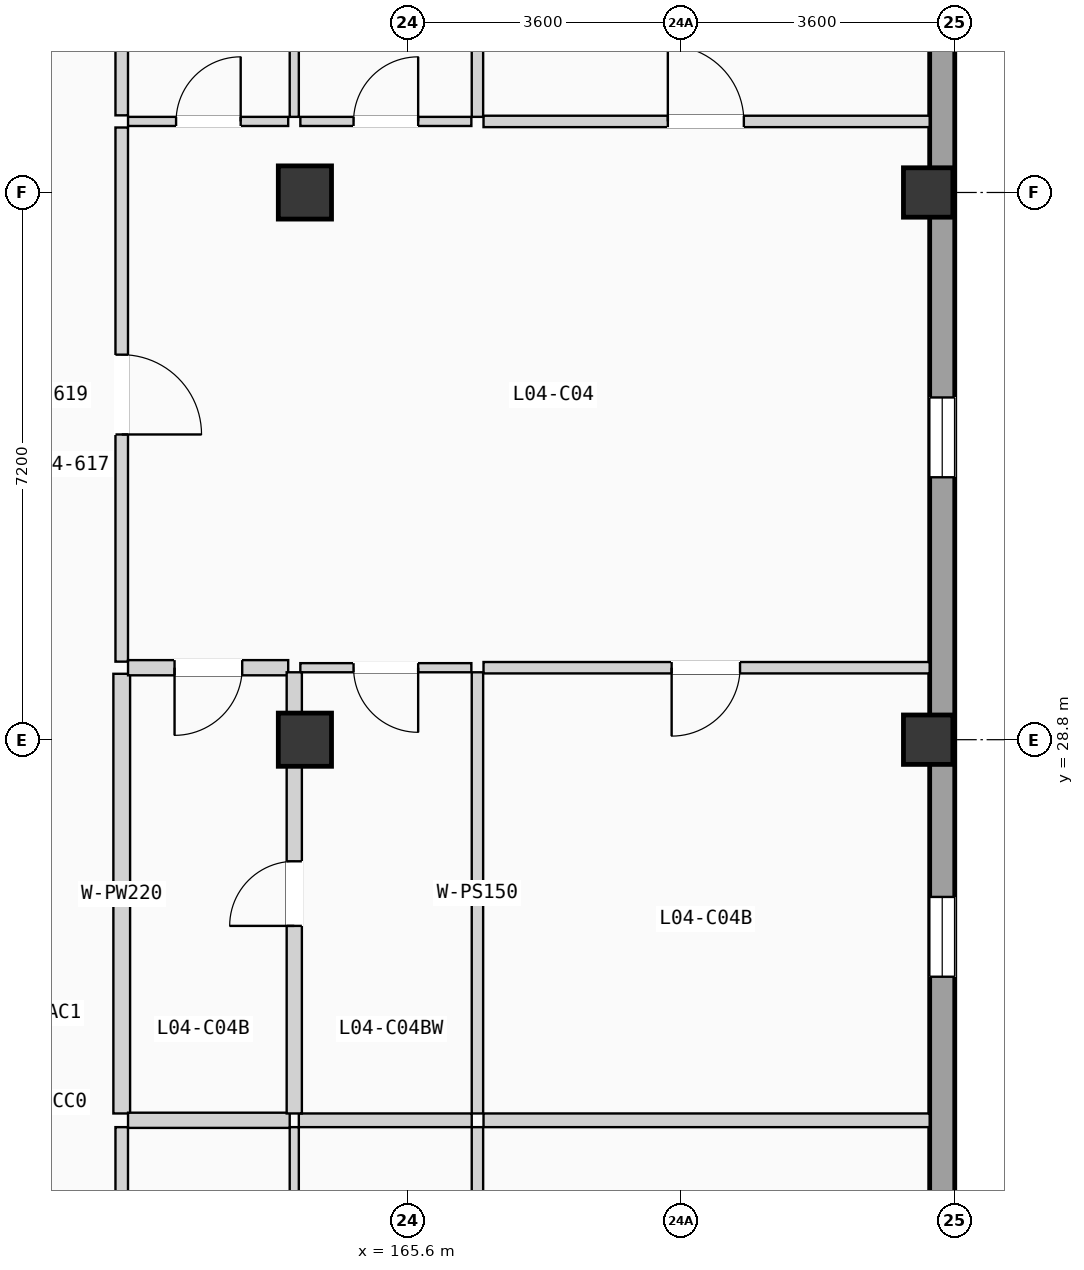
"""IFC4 building model, lengths in metres.
Left out: names, types, materials, properties, quantities, classifications, styles, units other than length and angle.
Written with IfcOpenShell. Run it as: python <this file> out.ifc"""

import sys

from ifc_helpers import new_model, si_unit, direction, frame, frame_2d, origin, origin_2d, place, context, subcontext, project, spatial, rectangle, extrude, element, fill, save


model = new_model("IFC4")
c1 = context("Model", 3, precision=1e-05, world=origin(), true_north=direction((0.0, 1.0)))
c2 = subcontext(c1, "Body", "Model", "MODEL_VIEW")
j1 = project(units=[si_unit("LENGTHUNIT", "METRE"), si_unit("PLANEANGLEUNIT", "RADIAN")], contexts=[c1])
p1 = place(None, origin())
s1 = spatial("IfcSite", under=j1, at=p1, CompositionType="ELEMENT")
p2 = place(p1, origin())
s2 = spatial("IfcBuilding", under=s1, at=p2, CompositionType="ELEMENT")
p3 = place(p2, frame((0.0, 0.0, 15.225)))
s3 = spatial("IfcBuildingStorey", under=s2, at=p3, CompositionType="ELEMENT", Elevation=15.225)
for number, where, z_axis, x_axis in (
    (1, (164.25, 28.8, 0.0), (0.0, 0.0, 1.0), (1.0, 0.0, 0.0)),
    (2, (164.25, 36.0, 0.0), (0.0, 0.0, 1.0), (1.0, 0.0, 0.0)),
):
    element("IfcColumn", number, at=place(p3, frame(where, z_axis=z_axis, x_axis=x_axis)), inside=s3, PredefinedType="COLUMN", context=c2, shape_type="SweptSolid", body=[
        extrude(rectangle(XDim=0.7, YDim=0.7, at=origin_2d()), origin(), (0.0, 0.0, 1.0), 3.15),
    ])
for number, where, z_axis, x_axis in (
    (3, (172.45, 28.8, 0.0), (0.0, 0.0, 1.0), (1.0, 0.0, 0.0)),
    (4, (172.45, 36.0, 0.0), (0.0, 0.0, 1.0), (1.0, 0.0, 0.0)),
):
    element("IfcColumn", number, at=place(p3, frame(where, z_axis=z_axis, x_axis=x_axis)), inside=s3, PredefinedType="COLUMN", context=c2, shape_type="SweptSolid", body=[
        extrude(rectangle(XDim=0.65, YDim=0.65, at=origin_2d()), origin(), (0.0, 0.0, 1.0), 3.15),
    ])
p4 = place(p3, frame((172.635, 0.33, 0.0), z_axis=(0.0, 0.0, 1.0), x_axis=(0.0, 1.0, 0.0)))
e5 = element("IfcWall", 5, at=p4, inside=s3, PredefinedType="SOLIDWALL", context=c2, shape_type="SweptSolid", body=[
    extrude(rectangle(XDim=49.74, YDim=0.33, at=frame_2d((24.87, 0.0))), origin(), (0.0, 0.0, 1.0), 2.89),
])
p5 = place(p4, frame((15.845, 0.0, 0.85)))
e6 = element("IfcOpeningElement", 6, at=p5, cuts=e5, PredefinedType="OPENING", context=c2, shape_type="SweptSolid", body=[
    extrude(rectangle(XDim=0.95, YDim=1.2, at=frame_2d((0.475, 0.6))), frame((0.0, 0.175, 0.0), z_axis=(0.0, -1.0, 0.0), x_axis=(1.0, 0.0, 0.0)), (0.0, 0.0, 1.0), 0.35),
])
p6 = place(p4, frame((9.201, 0.0, 0.9)))
e7 = element("IfcOpeningElement", 7, at=p6, cuts=e5, PredefinedType="OPENING", context=c2, shape_type="SweptSolid", body=[
    extrude(rectangle(XDim=1.05, YDim=1.2, at=frame_2d((0.525, 0.6))), frame((0.0, 0.175, 0.0), z_axis=(0.0, -1.0, 0.0), x_axis=(1.0, 0.0, 0.0)), (0.0, 0.0, 1.0), 0.35),
])
p7 = place(p4, frame((19.205, 0.0, 0.855)))
e8 = element("IfcOpeningElement", 8, at=p7, cuts=e5, PredefinedType="OPENING", context=c2, shape_type="SweptSolid", body=[
    extrude(rectangle(XDim=1.05, YDim=1.35, at=frame_2d((0.525, 0.675))), frame((0.0, 0.175, 0.0), z_axis=(0.0, -1.0, 0.0), x_axis=(1.0, 0.0, 0.0)), (0.0, 0.0, 1.0), 0.35),
])
p8 = place(p4, frame((31.923, 0.0, 0.705)))
e9 = element("IfcOpeningElement", 9, at=p8, cuts=e5, PredefinedType="OPENING", context=c2, shape_type="SweptSolid", body=[
    extrude(rectangle(XDim=1.05, YDim=1.5, at=frame_2d((0.525, 0.75))), frame((0.0, 0.175, 0.0), z_axis=(0.0, -1.0, 0.0), x_axis=(1.0, 0.0, 0.0)), (0.0, 0.0, 1.0), 0.35),
])
p9 = place(p4, frame((25.351, 0.0, 0.555)))
e10 = element("IfcOpeningElement", 10, at=p9, cuts=e5, PredefinedType="OPENING", context=c2, shape_type="SweptSolid", body=[
    extrude(rectangle(XDim=1.05, YDim=1.65, at=frame_2d((0.525, 0.825))), frame((0.0, 0.175, 0.0), z_axis=(0.0, -1.0, 0.0), x_axis=(1.0, 0.0, 0.0)), (0.0, 0.0, 1.0), 0.35),
])
p10 = place(p4, frame((39.102, 0.0, 0.85)))
e11 = element("IfcOpeningElement", 11, at=p10, cuts=e5, PredefinedType="OPENING", context=c2, shape_type="SweptSolid", body=[
    extrude(rectangle(XDim=0.95, YDim=1.2, at=frame_2d((0.475, 0.6))), frame((0.0, 0.175, 0.0), z_axis=(0.0, -1.0, 0.0), x_axis=(1.0, 0.0, 0.0)), (0.0, 0.0, 1.0), 0.35),
])
p11 = place(p3, frame((161.84, 18.79, 0.0), z_axis=(0.0, 0.0, 1.0), x_axis=(0.0, 1.0, 0.0)))
e12 = element("IfcWall", 12, at=p11, inside=s3, PredefinedType="PARTITIONING", context=c2, shape_type="SweptSolid", body=[
    extrude(rectangle(XDim=4.912, YDim=0.165, at=frame_2d((2.456, 0.0))), origin(), (0.0, 0.0, 1.0), 2.87),
])
p12 = place(p3, frame((161.84, 29.827, 0.0), z_axis=(0.0, 0.0, 1.0), x_axis=(0.0, 1.0, 0.0)))
e13 = element("IfcWall", 13, at=p12, inside=s3, PredefinedType="PARTITIONING", context=c2, shape_type="SweptSolid", body=[
    extrude(rectangle(XDim=7.028, YDim=0.165, at=frame_2d((3.514, 0.0))), origin(), (0.0, 0.0, 1.0), 2.87),
])
p13 = place(p12, frame((2.989, 0.0, 0.0)))
e14 = element("IfcOpeningElement", 14, at=p13, cuts=e13, PredefinedType="OPENING", context=c2, shape_type="SweptSolid", body=[
    extrude(rectangle(XDim=1.05, YDim=2.13, at=frame_2d((0.525, 1.065))), frame((0.0, 0.093, 0.0), z_axis=(0.0, -1.0, 0.0), x_axis=(1.0, 0.0, 0.0)), (0.0, 0.0, 1.0), 0.185),
])
p14 = place(p3, frame((161.84, 23.882, 0.0), z_axis=(0.0, 0.0, 1.0), x_axis=(0.0, 1.0, 0.0)))
e15 = element("IfcWall", 15, at=p14, inside=s3, PredefinedType="PLUMBINGWALL", context=c2, shape_type="SweptSolid", body=[
    extrude(rectangle(XDim=5.785, YDim=0.22, at=frame_2d((2.893, 0.0))), origin(), (0.0, 0.0, 1.0), 2.87),
])
p15 = place(p3, frame((161.84, 37.015, 0.0), z_axis=(0.0, 0.0, 1.0), x_axis=(0.0, 1.0, 0.0)))
e16 = element("IfcWall", 16, at=p15, inside=s3, PredefinedType="PARTITIONING", context=c2, shape_type="SweptSolid", body=[
    extrude(rectangle(XDim=5.785, YDim=0.165, at=frame_2d((2.893, 0.0))), origin(), (0.0, 0.0, 1.0), 2.87),
])
p16 = place(p3, frame((164.11, 18.77, 0.0), z_axis=(0.0, 0.0, 1.0), x_axis=(0.0, 1.0, 0.0)))
e17 = element("IfcWall", 17, at=p16, inside=s3, PredefinedType="PARTITIONING", context=c2, shape_type="SweptSolid", body=[
    extrude(rectangle(XDim=4.932, YDim=0.12, at=frame_2d((2.466, 0.0))), origin(), (0.0, 0.0, 1.0), 2.87),
])
p17 = place(p3, frame((161.923, 23.792, 0.0), z_axis=(0.0, 0.0, 1.0), x_axis=(1.0, 0.0, 0.0)))
e18 = element("IfcWall", 18, at=p17, inside=s3, PredefinedType="PLUMBINGWALL", context=c2, shape_type="SweptSolid", body=[
    extrude(rectangle(XDim=2.127, YDim=0.2, at=frame_2d((1.063, 0.0))), origin(), (0.0, 0.0, 1.0), 2.87),
])
p18 = place(p3, frame((166.52, 18.77, 0.0), z_axis=(0.0, 0.0, 1.0), x_axis=(0.0, 1.0, 0.0)))
e19 = element("IfcWall", 19, at=p18, inside=s3, PredefinedType="PARTITIONING", context=c2, shape_type="SweptSolid", body=[
    extrude(rectangle(XDim=4.932, YDim=0.15, at=frame_2d((2.466, 0.0))), origin(), (0.0, 0.0, 1.0), 2.87),
])
p19 = place(p3, frame((166.6, 23.792, 0.0), z_axis=(0.0, 0.0, 1.0), x_axis=(1.0, 0.0, 0.0)))
e20 = element("IfcWall", 20, at=p19, inside=s3, PredefinedType="PARTITIONING", context=c2, shape_type="SweptSolid", body=[
    extrude(rectangle(XDim=5.87, YDim=0.18, at=frame_2d((2.935, 0.0))), origin(), (0.0, 0.0, 1.0), 2.87),
])
p20 = place(p3, frame((164.17, 23.792, 0.0), z_axis=(0.0, 0.0, 1.0), x_axis=(1.0, 0.0, 0.0)))
e21 = element("IfcWall", 21, at=p20, inside=s3, PredefinedType="PARTITIONING", context=c2, shape_type="SweptSolid", body=[
    extrude(rectangle(XDim=2.275, YDim=0.18, at=frame_2d((1.138, 0.0))), origin(), (0.0, 0.0, 1.0), 2.87),
])
p21 = place(p3, frame((161.923, 29.747, 0.0), z_axis=(0.0, 0.0, 1.0), x_axis=(1.0, 0.0, 0.0)))
e22 = element("IfcWall", 22, at=p21, inside=s3, PredefinedType="PLUMBINGWALL", context=c2, shape_type="SweptSolid", body=[
    extrude(rectangle(XDim=2.107, YDim=0.2, at=frame_2d((1.053, 0.0))), origin(), (0.0, 0.0, 1.0), 2.87),
])
p22 = place(p21, frame((0.612, 0.0, 0.0)))
e23 = element("IfcOpeningElement", 23, at=p22, cuts=e22, PredefinedType="OPENING", context=c2, shape_type="SweptSolid", body=[
    extrude(rectangle(XDim=0.89, YDim=2.03, at=frame_2d((0.445, 1.015))), frame((0.0, 0.11, 0.0), z_axis=(0.0, -1.0, 0.0), x_axis=(1.0, 0.0, 0.0)), (0.0, 0.0, 1.0), 0.22),
])
p23 = place(p3, frame((161.923, 36.935, 0.0), z_axis=(0.0, 0.0, 1.0), x_axis=(1.0, 0.0, 0.0)))
e24 = element("IfcWall", 24, at=p23, inside=s3, PredefinedType="PARTITIONING", context=c2, shape_type="SweptSolid", body=[
    extrude(rectangle(XDim=2.107, YDim=0.12, at=frame_2d((1.053, 0.0))), origin(), (0.0, 0.0, 1.0), 2.87),
])
p24 = place(p23, frame((0.632, 0.0, 0.0)))
e25 = element("IfcOpeningElement", 25, at=p24, cuts=e24, PredefinedType="OPENING", context=c2, shape_type="SweptSolid", body=[
    extrude(rectangle(XDim=0.85, YDim=2.01, at=frame_2d((0.425, 1.005))), frame((0.0, 0.07, 0.0), z_axis=(0.0, -1.0, 0.0), x_axis=(1.0, 0.0, 0.0)), (0.0, 0.0, 1.0), 0.14),
])
p25 = place(p3, frame((166.6, 29.747, 0.0), z_axis=(0.0, 0.0, 1.0), x_axis=(1.0, 0.0, 0.0)))
e26 = element("IfcWall", 26, at=p25, inside=s3, PredefinedType="PARTITIONING", context=c2, shape_type="SweptSolid", body=[
    extrude(rectangle(XDim=5.87, YDim=0.15, at=frame_2d((2.935, 0.0))), origin(), (0.0, 0.0, 1.0), 2.87),
])
p26 = place(p25, frame((2.475, 0.0, 0.0)))
e27 = element("IfcOpeningElement", 27, at=p26, cuts=e26, PredefinedType="OPENING", context=c2, shape_type="SweptSolid", body=[
    extrude(rectangle(XDim=0.9, YDim=2.04, at=frame_2d((0.45, 1.02))), frame((0.0, 0.085, 0.0), z_axis=(0.0, -1.0, 0.0), x_axis=(1.0, 0.0, 0.0)), (0.0, 0.0, 1.0), 0.17),
])
p27 = place(p3, frame((164.19, 29.747, 0.0), z_axis=(0.0, 0.0, 1.0), x_axis=(1.0, 0.0, 0.0)))
e28 = element("IfcWall", 28, at=p27, inside=s3, PredefinedType="PARTITIONING", context=c2, shape_type="SweptSolid", body=[
    extrude(rectangle(XDim=2.25, YDim=0.12, at=frame_2d((1.125, 0.0))), origin(), (0.0, 0.0, 1.0), 2.87),
])
p28 = place(p27, frame((0.7, 0.0, 0.0)))
e29 = element("IfcOpeningElement", 29, at=p28, cuts=e28, PredefinedType="OPENING", context=c2, shape_type="SweptSolid", body=[
    extrude(rectangle(XDim=0.85, YDim=2.01, at=frame_2d((0.425, 1.005))), frame((0.0, 0.07, 0.0), z_axis=(0.0, -1.0, 0.0), x_axis=(1.0, 0.0, 0.0)), (0.0, 0.0, 1.0), 0.14),
])
p29 = place(p3, frame((166.6, 36.935, 0.0), z_axis=(0.0, 0.0, 1.0), x_axis=(1.0, 0.0, 0.0)))
e30 = element("IfcWall", 30, at=p29, inside=s3, PredefinedType="PARTITIONING", context=c2, shape_type="SweptSolid", body=[
    extrude(rectangle(XDim=5.87, YDim=0.15, at=frame_2d((2.935, 0.0))), origin(), (0.0, 0.0, 1.0), 2.87),
])
p30 = place(p29, frame((2.425, 0.0, 0.0)))
e31 = element("IfcOpeningElement", 31, at=p30, cuts=e30, PredefinedType="OPENING", context=c2, shape_type="SweptSolid", body=[
    extrude(rectangle(XDim=1.0, YDim=2.06, at=frame_2d((0.5, 1.03))), frame((0.0, 0.085, 0.0), z_axis=(0.0, -1.0, 0.0), x_axis=(1.0, 0.0, 0.0)), (0.0, 0.0, 1.0), 0.17),
])
p31 = place(p3, frame((164.19, 36.935, 0.0), z_axis=(0.0, 0.0, 1.0), x_axis=(1.0, 0.0, 0.0)))
e32 = element("IfcWall", 32, at=p31, inside=s3, PredefinedType="PARTITIONING", context=c2, shape_type="SweptSolid", body=[
    extrude(rectangle(XDim=2.25, YDim=0.12, at=frame_2d((1.125, 0.0))), origin(), (0.0, 0.0, 1.0), 2.87),
])
p32 = place(p31, frame((0.7, 0.0, 0.0)))
e33 = element("IfcOpeningElement", 33, at=p32, cuts=e32, PredefinedType="OPENING", context=c2, shape_type="SweptSolid", body=[
    extrude(rectangle(XDim=0.85, YDim=2.01, at=frame_2d((0.425, 1.005))), frame((0.0, 0.07, 0.0), z_axis=(0.0, -1.0, 0.0), x_axis=(1.0, 0.0, 0.0)), (0.0, 0.0, 1.0), 0.14),
])
p33 = place(p3, frame((164.11, 23.882, 0.0), z_axis=(0.0, 0.0, 1.0), x_axis=(0.0, 1.0, 0.0)))
e34 = element("IfcWall", 34, at=p33, inside=s3, PredefinedType="PLUMBINGWALL", context=c2, shape_type="SweptSolid", body=[
    extrude(rectangle(XDim=5.805, YDim=0.2, at=frame_2d((2.902, 0.0))), origin(), (0.0, 0.0, 1.0), 2.87),
])
p34 = place(p33, frame((2.468, 0.0, 0.0)))
e35 = element("IfcOpeningElement", 35, at=p34, cuts=e34, PredefinedType="OPENING", context=c2, shape_type="SweptSolid", body=[
    extrude(rectangle(XDim=0.85, YDim=2.01, at=frame_2d((0.425, 1.005))), frame((0.0, 0.11, 0.0), z_axis=(0.0, -1.0, 0.0), x_axis=(1.0, 0.0, 0.0)), (0.0, 0.0, 1.0), 0.22),
])
p35 = place(p3, frame((164.11, 36.995, 0.0), z_axis=(0.0, 0.0, 1.0), x_axis=(0.0, 1.0, 0.0)))
e36 = element("IfcWall", 36, at=p35, inside=s3, PredefinedType="PARTITIONING", context=c2, shape_type="SweptSolid", body=[
    extrude(rectangle(XDim=5.805, YDim=0.12, at=frame_2d((2.902, 0.0))), origin(), (0.0, 0.0, 1.0), 2.87),
])
for number, where, z_axis, x_axis in (
    (37, (166.52, 23.882, 0.0), (0.0, 0.0, 1.0), (0.0, 1.0, 0.0)),
    (38, (166.52, 36.995, 0.0), (0.0, 0.0, 1.0), (0.0, 1.0, 0.0)),
):
    element("IfcWall", number, at=place(p3, frame(where, z_axis=z_axis, x_axis=x_axis)), inside=s3, PredefinedType="PARTITIONING", context=c2, shape_type="SweptSolid", body=[
        extrude(rectangle(XDim=5.805, YDim=0.15, at=frame_2d((2.902, 0.0))), origin(), (0.0, 0.0, 1.0), 2.87),
    ])
p36 = place(p8, origin())
e39 = element("IfcWindow", 39, at=p36, inside=s3, PartitioningType="SINGLE_PANEL", PredefinedType="WINDOW", context=c2, shape_type="SweptSolid", body=[
    extrude(rectangle(XDim=1.05, YDim=1.5, at=frame_2d((0.525, 0.75))), frame((0.0, 0.03, 0.0), z_axis=(0.0, -1.0, 0.0), x_axis=(1.0, 0.0, 0.0)), (0.0, 0.0, 1.0), 0.06),
])
fill(e9, e39)
p37 = place(p9, origin())
e40 = element("IfcWindow", 40, at=p37, inside=s3, PartitioningType="SINGLE_PANEL", PredefinedType="WINDOW", context=c2, shape_type="SweptSolid", body=[
    extrude(rectangle(XDim=1.05, YDim=1.65, at=frame_2d((0.525, 0.825))), frame((0.0, 0.03, 0.0), z_axis=(0.0, -1.0, 0.0), x_axis=(1.0, 0.0, 0.0)), (0.0, 0.0, 1.0), 0.06),
])
fill(e10, e40)
p38 = place(p13, frame((1.05, 0.0, 0.0), z_axis=(0.0, 0.0, 1.0), x_axis=(-1.0, 0.0, 0.0)))
e41 = element("IfcDoor", 41, at=p38, inside=s3, OperationType="SINGLE_SWING_LEFT", PredefinedType="DOOR", context=c2, shape_type="SweptSolid", body=[
    extrude(rectangle(XDim=1.05, YDim=2.13, at=frame_2d((0.525, 1.065))), frame((0.0, 0.025, 0.0), z_axis=(0.0, -1.0, 0.0), x_axis=(1.0, 0.0, 0.0)), (0.0, 0.0, 1.0), 0.05),
])
fill(e14, e41)
p39 = place(p22, frame((0.89, 0.0, 0.0), z_axis=(0.0, 0.0, 1.0), x_axis=(-1.0, 0.0, 0.0)))
e42 = element("IfcDoor", 42, at=p39, inside=s3, OperationType="SINGLE_SWING_LEFT", PredefinedType="DOOR", context=c2, shape_type="SweptSolid", body=[
    extrude(rectangle(XDim=0.89, YDim=2.03, at=frame_2d((0.445, 1.015))), frame((0.0, 0.025, 0.0), z_axis=(0.0, -1.0, 0.0), x_axis=(1.0, 0.0, 0.0)), (0.0, 0.0, 1.0), 0.05),
])
fill(e23, e42)
p40 = place(p24, origin())
e43 = element("IfcDoor", 43, at=p40, inside=s3, OperationType="SINGLE_SWING_RIGHT", PredefinedType="DOOR", context=c2, shape_type="SweptSolid", body=[
    extrude(rectangle(XDim=0.85, YDim=2.01, at=frame_2d((0.425, 1.005))), frame((0.0, 0.025, 0.0), z_axis=(0.0, -1.0, 0.0), x_axis=(1.0, 0.0, 0.0)), (0.0, 0.0, 1.0), 0.05),
])
fill(e25, e43)
p41 = place(p26, frame((0.9, 0.0, 0.0), z_axis=(0.0, 0.0, 1.0), x_axis=(-1.0, 0.0, 0.0)))
e44 = element("IfcDoor", 44, at=p41, inside=s3, OperationType="SINGLE_SWING_LEFT", PredefinedType="DOOR", context=c2, shape_type="SweptSolid", body=[
    extrude(rectangle(XDim=0.9, YDim=2.04, at=frame_2d((0.45, 1.02))), frame((0.0, 0.025, 0.0), z_axis=(0.0, -1.0, 0.0), x_axis=(1.0, 0.0, 0.0)), (0.0, 0.0, 1.0), 0.05),
])
fill(e27, e44)
p42 = place(p28, frame((0.85, 0.0, 0.0), z_axis=(0.0, 0.0, 1.0), x_axis=(-1.0, 0.0, 0.0)))
e45 = element("IfcDoor", 45, at=p42, inside=s3, OperationType="SINGLE_SWING_RIGHT", PredefinedType="DOOR", context=c2, shape_type="SweptSolid", body=[
    extrude(rectangle(XDim=0.85, YDim=2.01, at=frame_2d((0.425, 1.005))), frame((0.0, 0.025, 0.0), z_axis=(0.0, -1.0, 0.0), x_axis=(1.0, 0.0, 0.0)), (0.0, 0.0, 1.0), 0.05),
])
fill(e29, e45)
p43 = place(p30, origin())
e46 = element("IfcDoor", 46, at=p43, inside=s3, OperationType="SINGLE_SWING_LEFT", PredefinedType="DOOR", context=c2, shape_type="SweptSolid", body=[
    extrude(rectangle(XDim=1.0, YDim=2.06, at=frame_2d((0.5, 1.03))), frame((0.0, 0.025, 0.0), z_axis=(0.0, -1.0, 0.0), x_axis=(1.0, 0.0, 0.0)), (0.0, 0.0, 1.0), 0.05),
])
fill(e31, e46)
p44 = place(p32, origin())
e47 = element("IfcDoor", 47, at=p44, inside=s3, OperationType="SINGLE_SWING_RIGHT", PredefinedType="DOOR", context=c2, shape_type="SweptSolid", body=[
    extrude(rectangle(XDim=0.85, YDim=2.01, at=frame_2d((0.425, 1.005))), frame((0.0, 0.025, 0.0), z_axis=(0.0, -1.0, 0.0), x_axis=(1.0, 0.0, 0.0)), (0.0, 0.0, 1.0), 0.05),
])
fill(e33, e47)
p45 = place(p34, origin())
e48 = element("IfcDoor", 48, at=p45, inside=s3, OperationType="SINGLE_SWING_LEFT", PredefinedType="DOOR", context=c2, shape_type="SweptSolid", body=[
    extrude(rectangle(XDim=0.85, YDim=2.01, at=frame_2d((0.425, 1.005))), frame((0.0, 0.025, 0.0), z_axis=(0.0, -1.0, 0.0), x_axis=(1.0, 0.0, 0.0)), (0.0, 0.0, 1.0), 0.05),
])
fill(e35, e48)
save(model, sys.argv[1])
